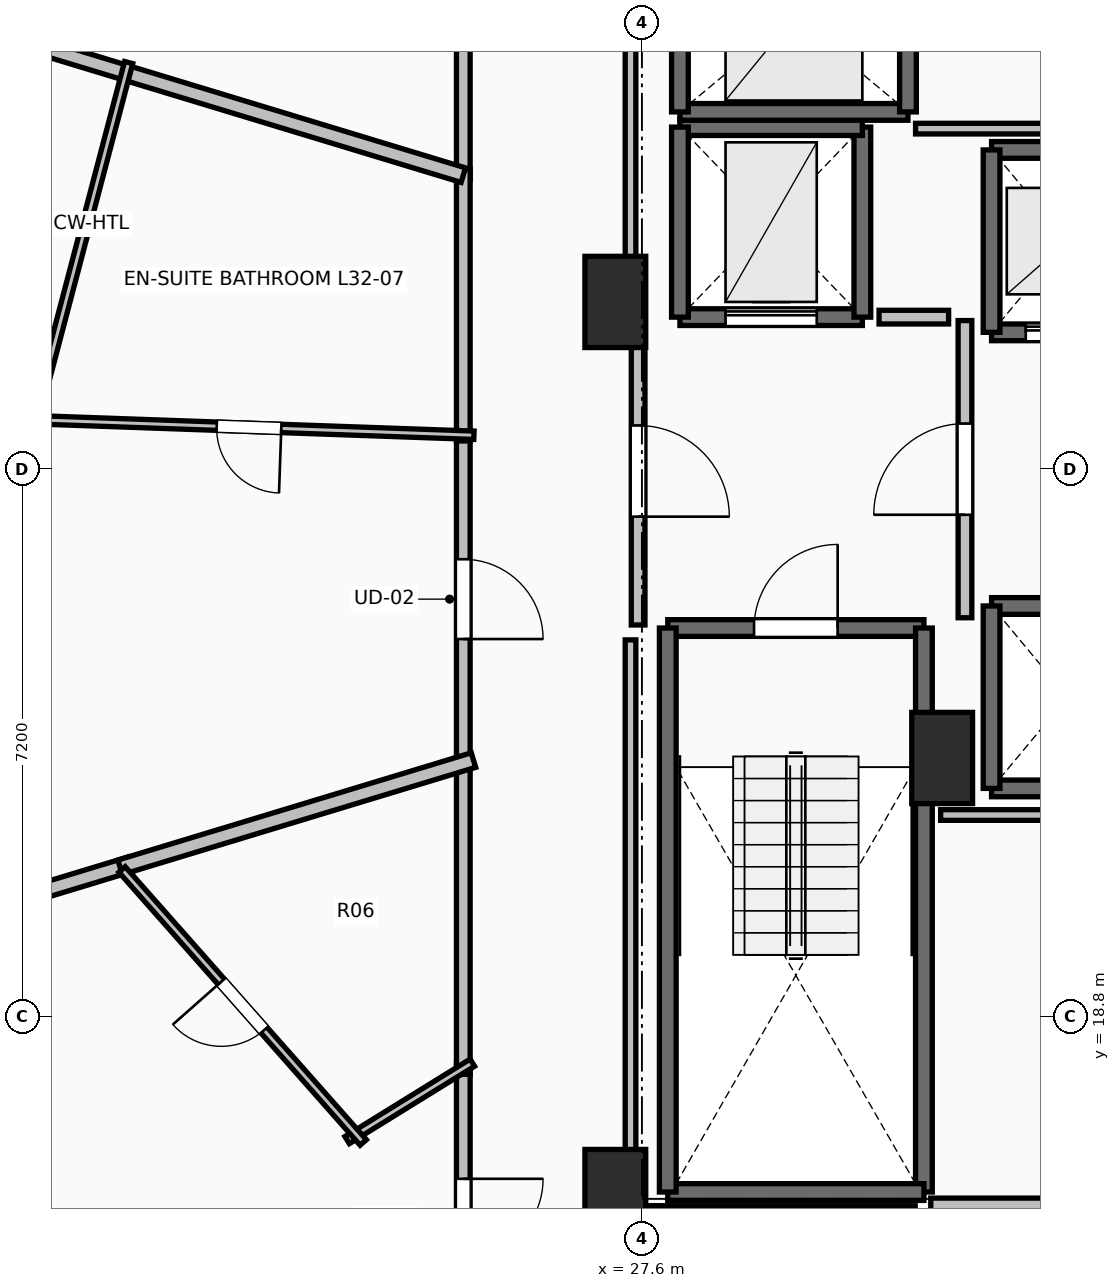
"""IFC4 building model, lengths in metres.
Left out: names, types, materials, properties, quantities, classifications, styles, units other than length and angle.
Written with IfcOpenShell. Run it as: python <this file> out.ifc"""

import sys

from ifc_helpers import new_model, si_unit, direction, frame, frame_2d, origin, origin_2d, place, context, subcontext, project, spatial, rectangle, extrude, element, fill, save


model = new_model("IFC4")
c1 = context("Model", 3, precision=1e-05, world=origin(), true_north=direction((0.0, 1.0)))
c2 = subcontext(c1, "Body", "Model", "MODEL_VIEW")
j1 = project(units=[si_unit("LENGTHUNIT", "METRE"), si_unit("PLANEANGLEUNIT", "RADIAN")], contexts=[c1])
p1 = place(None, origin())
s1 = spatial("IfcSite", under=j1, at=p1, CompositionType="ELEMENT")
p2 = place(p1, origin())
s2 = spatial("IfcBuilding", under=s1, at=p2, CompositionType="ELEMENT")
p3 = place(p2, frame((0.0, 0.0, 120.8)))
s3 = spatial("IfcBuildingStorey", under=s2, at=p3, CompositionType="ELEMENT", Elevation=120.8)
for number, where, z_axis, x_axis in (
    (1, (27.25, 16.45, 0.0), (0.0, 0.0, 1.0), (1.0, 0.0, 0.0)),
    (2, (27.25, 28.2, 0.0), (0.0, 0.0, 1.0), (1.0, 0.0, 0.0)),
    (3, (31.55, 22.2, 0.0), (0.0, 0.0, 1.0), (1.0, 0.0, 0.0)),
):
    element("IfcColumn", number, at=place(p3, frame(where, z_axis=z_axis, x_axis=x_axis)), inside=s3, PredefinedType="PILASTER", context=c2, shape_type="SweptSolid", body=[
        extrude(rectangle(XDim=0.8, YDim=1.2, at=origin_2d()), origin(), (0.0, 0.0, 1.0), 3.5),
    ])
p4 = place(p3, frame((27.94, 23.91, 0.0), z_axis=(0.0, 0.0, 1.0), x_axis=(1.0, 0.0, 0.0)))
e4 = element("IfcWall", 4, at=p4, inside=s3, PredefinedType="SOLIDWALL", context=c2, shape_type="SweptSolid", body=[
    extrude(rectangle(XDim=3.37, YDim=0.22, at=frame_2d((1.685, 0.0))), origin(), (0.0, 0.0, 1.0), 3.15),
])
p5 = place(p4, frame((1.135, 0.0, 0.0)))
e5 = element("IfcOpeningElement", 5, at=p5, cuts=e4, PredefinedType="OPENING", context=c2, shape_type="SweptSolid", body=[
    extrude(rectangle(XDim=1.1, YDim=2.15, at=frame_2d((0.55, 1.075))), frame((0.0, 0.125, 0.0), z_axis=(0.0, -1.0, 0.0), x_axis=(1.0, 0.0, 0.0)), (0.0, 0.0, 1.0), 0.25),
])
p6 = place(p3, frame((31.31, 23.91, 0.0), z_axis=(0.0, 0.0, 1.0), x_axis=(0.0, -1.0, 0.0)))
e6 = element("IfcWall", 6, at=p6, inside=s3, PredefinedType="SOLIDWALL", context=c2, shape_type="SweptSolid", body=[
    extrude(rectangle(XDim=7.42, YDim=0.22, at=frame_2d((3.71, 0.0))), origin(), (0.0, 0.0, 1.0), 3.15),
])
p7 = place(p3, frame((31.31, 16.49, 0.0), z_axis=(0.0, 0.0, 1.0), x_axis=(-1.0, 0.0, 0.0)))
e7 = element("IfcWall", 7, at=p7, inside=s3, PredefinedType="SOLIDWALL", context=c2, shape_type="SweptSolid", body=[
    extrude(rectangle(XDim=3.37, YDim=0.22, at=frame_2d((1.685, 0.0))), origin(), (0.0, 0.0, 1.0), 3.15),
])
p8 = place(p3, frame((27.94, 16.49, 0.0), z_axis=(0.0, 0.0, 1.0), x_axis=(0.0, 1.0, 0.0)))
e8 = element("IfcWall", 8, at=p8, inside=s3, PredefinedType="SOLIDWALL", context=c2, shape_type="SweptSolid", body=[
    extrude(rectangle(XDim=7.42, YDim=0.22, at=frame_2d((3.71, 0.0))), origin(), (0.0, 0.0, 1.0), 3.15),
])
p9 = place(p3, frame((32.2, 27.8, 0.0), z_axis=(0.0, 0.0, 1.0), x_axis=(1.0, 0.0, 0.0)))
e9 = element("IfcWall", 9, at=p9, inside=s3, PredefinedType="SOLIDWALL", context=c2, shape_type="SweptSolid", body=[
    extrude(rectangle(XDim=2.0, YDim=0.22, at=frame_2d((1.0, 0.0))), origin(), (0.0, 0.0, 1.0), 3.15),
])
p10 = place(p9, frame((0.45, 0.0, 0.0)))
e10 = element("IfcOpeningElement", 10, at=p10, cuts=e9, PredefinedType="OPENING", context=c2, shape_type="SweptSolid", body=[
    extrude(rectangle(XDim=1.1, YDim=2.2, at=frame_2d((0.55, 1.1))), frame((0.0, 0.125, 0.0), z_axis=(0.0, -1.0, 0.0), x_axis=(1.0, 0.0, 0.0)), (0.0, 0.0, 1.0), 0.25),
])
p11 = place(p3, frame((34.2, 30.2, 0.0), z_axis=(0.0, 0.0, 1.0), x_axis=(-1.0, 0.0, 0.0)))
e11 = element("IfcWall", 11, at=p11, inside=s3, PredefinedType="SOLIDWALL", context=c2, shape_type="SweptSolid", body=[
    extrude(rectangle(XDim=2.0, YDim=0.22, at=frame_2d((1.0, 0.0))), origin(), (0.0, 0.0, 1.0), 3.15),
])
p12 = place(p3, frame((32.2, 30.2, 0.0), z_axis=(0.0, 0.0, 1.0), x_axis=(0.0, -1.0, 0.0)))
e12 = element("IfcWall", 12, at=p12, inside=s3, PredefinedType="SOLIDWALL", context=c2, shape_type="SweptSolid", body=[
    extrude(rectangle(XDim=2.4, YDim=0.22, at=frame_2d((1.2, 0.0))), origin(), (0.0, 0.0, 1.0), 3.15),
])
for number, where, z_axis, x_axis in (
    (13, (32.2, 21.8, 0.0), (0.0, 0.0, 1.0), (1.0, 0.0, 0.0)),
    (14, (34.2, 24.2, 0.0), (0.0, 0.0, 1.0), (-1.0, 0.0, 0.0)),
):
    element("IfcWall", number, at=place(p3, frame(where, z_axis=z_axis, x_axis=x_axis)), inside=s3, PredefinedType="SOLIDWALL", context=c2, shape_type="SweptSolid", body=[
        extrude(rectangle(XDim=2.0, YDim=0.22, at=frame_2d((1.0, 0.0))), origin(), (0.0, 0.0, 1.0), 3.15),
    ])
p13 = place(p3, frame((32.2, 24.2, 0.0), z_axis=(0.0, 0.0, 1.0), x_axis=(0.0, -1.0, 0.0)))
e15 = element("IfcWall", 15, at=p13, inside=s3, PredefinedType="SOLIDWALL", context=c2, shape_type="SweptSolid", body=[
    extrude(rectangle(XDim=2.4, YDim=0.22, at=frame_2d((1.2, 0.0))), origin(), (0.0, 0.0, 1.0), 3.15),
])
p14 = place(p3, frame((28.1, 28.0, 0.0), z_axis=(0.0, 0.0, 1.0), x_axis=(1.0, 0.0, 0.0)))
e16 = element("IfcWall", 16, at=p14, inside=s3, PredefinedType="SHEAR", context=c2, shape_type="SweptSolid", body=[
    extrude(rectangle(XDim=2.4, YDim=0.22, at=frame_2d((1.2, 0.0))), origin(), (0.0, 0.0, 1.0), 3.15),
])
p15 = place(p14, frame((0.6, 0.0, 0.0)))
e17 = element("IfcOpeningElement", 17, at=p15, cuts=e16, PredefinedType="OPENING", context=c2, shape_type="SweptSolid", body=[
    extrude(rectangle(XDim=1.2, YDim=2.2, at=frame_2d((0.6, 1.1))), frame((0.0, 0.125, 0.0), z_axis=(0.0, -1.0, 0.0), x_axis=(1.0, 0.0, 0.0)), (0.0, 0.0, 1.0), 0.25),
])
p16 = place(p3, frame((30.5, 28.0, 0.0), z_axis=(0.0, 0.0, 1.0), x_axis=(0.0, 1.0, 0.0)))
e18 = element("IfcWall", 18, at=p16, inside=s3, PredefinedType="SHEAR", context=c2, shape_type="SweptSolid", body=[
    extrude(rectangle(XDim=2.5, YDim=0.22, at=frame_2d((1.25, 0.0))), origin(), (0.0, 0.0, 1.0), 3.15),
])
p17 = place(p3, frame((30.5, 30.5, 0.0), z_axis=(0.0, 0.0, 1.0), x_axis=(-1.0, 0.0, 0.0)))
e19 = element("IfcWall", 19, at=p17, inside=s3, PredefinedType="SHEAR", context=c2, shape_type="SweptSolid", body=[
    extrude(rectangle(XDim=2.4, YDim=0.22, at=frame_2d((1.2, 0.0))), origin(), (0.0, 0.0, 1.0), 3.15),
])
p18 = place(p3, frame((28.1, 30.5, 0.0), z_axis=(0.0, 0.0, 1.0), x_axis=(0.0, -1.0, 0.0)))
e20 = element("IfcWall", 20, at=p18, inside=s3, PredefinedType="SHEAR", context=c2, shape_type="SweptSolid", body=[
    extrude(rectangle(XDim=2.5, YDim=0.22, at=frame_2d((1.25, 0.0))), origin(), (0.0, 0.0, 1.0), 3.15),
])
p19 = place(p3, frame((28.1, 30.7, 0.0), z_axis=(0.0, 0.0, 1.0), x_axis=(1.0, 0.0, 0.0)))
e21 = element("IfcWall", 21, at=p19, inside=s3, PredefinedType="SOLIDWALL", context=c2, shape_type="SweptSolid", body=[
    extrude(rectangle(XDim=3.0, YDim=0.22, at=frame_2d((1.5, 0.0))), origin(), (0.0, 0.0, 1.0), 3.15),
])
for number, where, z_axis, x_axis in (
    (22, (31.1, 30.7, 0.0), (0.0, 0.0, 1.0), (0.0, 1.0, 0.0)),
    (23, (28.1, 33.2, 0.0), (0.0, 0.0, 1.0), (0.0, -1.0, 0.0)),
):
    element("IfcWall", number, at=place(p3, frame(where, z_axis=z_axis, x_axis=x_axis)), inside=s3, PredefinedType="SOLIDWALL", context=c2, shape_type="SweptSolid", body=[
        extrude(rectangle(XDim=2.5, YDim=0.22, at=frame_2d((1.25, 0.0))), origin(), (0.0, 0.0, 1.0), 3.15),
    ])
p20 = place(p3, frame((31.85, 24.045, 0.0), z_axis=(0.0, 0.0, 1.0), x_axis=(0.0, 1.0, 0.0)))
e24 = element("IfcWall", 24, at=p20, inside=s3, PredefinedType="PARTITIONING", context=c2, shape_type="SweptSolid", body=[
    extrude(rectangle(XDim=3.91, YDim=0.18, at=frame_2d((1.955, 0.0))), origin(), (0.0, 0.0, 1.0), 3.15),
])
p21 = place(p20, frame((1.355, 0.0, 0.0)))
e25 = element("IfcOpeningElement", 25, at=p21, cuts=e24, PredefinedType="OPENING", context=c2, shape_type="SweptSolid", body=[
    extrude(rectangle(XDim=1.2, YDim=2.15, at=frame_2d((0.6, 1.075))), frame((0.0, 0.105, 0.0), z_axis=(0.0, -1.0, 0.0), x_axis=(1.0, 0.0, 0.0)), (0.0, 0.0, 1.0), 0.21),
])
p22 = place(p3, frame((27.55, 28.0, 0.0), z_axis=(0.0, 0.0, 1.0), x_axis=(0.0, -1.0, 0.0)))
e26 = element("IfcWall", 26, at=p22, inside=s3, PredefinedType="PARTITIONING", context=c2, shape_type="SweptSolid", body=[
    extrude(rectangle(XDim=4.05, YDim=0.18, at=frame_2d((2.025, 0.0))), origin(), (0.0, 0.0, 1.0), 3.15),
])
p23 = place(p22, frame((1.425, 0.0, 0.0)))
e27 = element("IfcOpeningElement", 27, at=p23, cuts=e26, PredefinedType="OPENING", context=c2, shape_type="SweptSolid", body=[
    extrude(rectangle(XDim=1.2, YDim=2.15, at=frame_2d((0.6, 1.075))), frame((0.0, 0.105, 0.0), z_axis=(0.0, -1.0, 0.0), x_axis=(1.0, 0.0, 0.0)), (0.0, 0.0, 1.0), 0.21),
])
p24 = place(p3, frame((31.4, 16.32, 0.0), z_axis=(0.0, 0.0, 1.0), x_axis=(1.0, 0.0, 0.0)))
e28 = element("IfcWall", 28, at=p24, inside=s3, PredefinedType="PARTITIONING", context=c2, shape_type="SweptSolid", body=[
    extrude(rectangle(XDim=7.4, YDim=0.18, at=frame_2d((3.7, 0.0))), origin(), (0.0, 0.0, 1.0), 3.15),
])
p25 = place(p24, frame((3.275, 0.0, 0.0)))
e29 = element("IfcOpeningElement", 29, at=p25, cuts=e28, PredefinedType="OPENING", context=c2, shape_type="SweptSolid", body=[
    extrude(rectangle(XDim=0.85, YDim=2.1, at=frame_2d((0.425, 1.05))), frame((0.0, 0.105, 0.0), z_axis=(0.0, -1.0, 0.0), x_axis=(1.0, 0.0, 0.0)), (0.0, 0.0, 1.0), 0.21),
])
p26 = place(p3, frame((25.25, 35.261, 0.0), z_axis=(0.0, 0.0, 1.0), x_axis=(0.0, -1.0, 0.0)))
e30 = element("IfcWall", 30, at=p26, inside=s3, PredefinedType="PARTITIONING", context=c2, shape_type="SweptSolid", body=[
    extrude(rectangle(XDim=5.453, YDim=0.18, at=frame_2d((2.727, 0.0))), origin(), (0.0, 0.0, 1.0), 2.342),
])
p27 = place(p26, frame((2.201, 0.0, 0.0)))
e31 = element("IfcOpeningElement", 31, at=p27, cuts=e30, PredefinedType="OPENING", context=c2, shape_type="SweptSolid", body=[
    extrude(rectangle(XDim=1.05, YDim=2.2, at=frame_2d((0.525, 1.1))), frame((0.0, 0.105, 0.0), z_axis=(0.0, -1.0, 0.0), x_axis=(1.0, 0.0, 0.0)), (0.0, 0.0, 1.0), 0.21),
])
p28 = place(p3, frame((25.25, 26.511, 0.0), z_axis=(0.0, 0.0, 1.0), x_axis=(0.0, -1.0, 0.0)))
e32 = element("IfcWall", 32, at=p28, inside=s3, PredefinedType="PARTITIONING", context=c2, shape_type="SweptSolid", body=[
    extrude(rectangle(XDim=4.442, YDim=0.18, at=frame_2d((2.221, 0.0))), origin(), (0.0, 0.0, 1.0), 3.15),
])
p29 = place(p28, frame((1.696, 0.0, 0.0)))
e33 = element("IfcOpeningElement", 33, at=p29, cuts=e32, PredefinedType="OPENING", context=c2, shape_type="SweptSolid", body=[
    extrude(rectangle(XDim=1.05, YDim=2.2, at=frame_2d((0.525, 1.1))), frame((0.0, 0.105, 0.0), z_axis=(0.0, -1.0, 0.0), x_axis=(1.0, 0.0, 0.0)), (0.0, 0.0, 1.0), 0.21),
])
p30 = place(p3, frame((25.25, 29.948, 0.0), z_axis=(0.0, 0.0, 1.0), x_axis=(0.0, -1.0, 0.0)))
e34 = element("IfcWall", 34, at=p30, inside=s3, PredefinedType="PARTITIONING", context=c2, shape_type="SweptSolid", body=[
    extrude(rectangle(XDim=3.577, YDim=0.18, at=frame_2d((1.789, 0.0))), origin(), (0.0, 0.0, 1.0), 2.342),
])
p31 = place(p3, frame((25.25, 18.178, 0.0), z_axis=(0.0, 0.0, 1.0), x_axis=(0.0, -1.0, 0.0)))
e35 = element("IfcWall", 35, at=p31, inside=s3, PredefinedType="PARTITIONING", context=c2, shape_type="SweptSolid", body=[
    extrude(rectangle(XDim=4.078, YDim=0.18, at=frame_2d((2.039, 0.0))), origin(), (0.0, 0.0, 1.0), 2.342),
])
p32 = place(p31, frame((1.514, 0.0, 0.0)))
e36 = element("IfcOpeningElement", 36, at=p32, cuts=e35, PredefinedType="OPENING", context=c2, shape_type="SweptSolid", body=[
    extrude(rectangle(XDim=1.05, YDim=2.2, at=frame_2d((0.525, 1.1))), frame((0.0, 0.105, 0.0), z_axis=(0.0, -1.0, 0.0), x_axis=(1.0, 0.0, 0.0)), (0.0, 0.0, 1.0), 0.21),
])
p33 = place(p3, frame((25.25, 22.209, 0.0), z_axis=(0.0, 0.0, 1.0), x_axis=(0.0, -1.0, 0.0)))
e37 = element("IfcWall", 37, at=p33, inside=s3, PredefinedType="PARTITIONING", context=c2, shape_type="SweptSolid", body=[
    extrude(rectangle(XDim=4.171, YDim=0.18, at=frame_2d((2.085, 0.0))), origin(), (0.0, 0.0, 1.0), 3.15),
])
p34 = place(p3, frame((13.663, 33.383, 0.0), z_axis=(0.0, 0.0, 1.0), x_axis=(0.956933802543, -0.290306213422, 0.0)))
e38 = element("IfcWall", 38, at=p34, inside=s3, PredefinedType="PARTITIONING", context=c2, shape_type="SweptSolid", body=[
    extrude(rectangle(XDim=12.108, YDim=0.2, at=frame_2d((6.054, 0.0))), origin(), (0.0, 0.0, 1.0), 2.342),
])
p35 = place(p3, frame((19.575, 26.515, 0.0), z_axis=(0.0, 0.0, 1.0), x_axis=(0.254478876497, 0.967078332617, 0.0)))
e39 = element("IfcWall", 39, at=p35, inside=s3, PredefinedType="PARTITIONING", context=c2, shape_type="SweptSolid", body=[
    extrude(rectangle(XDim=4.999, YDim=0.11, at=frame_2d((2.5, 0.0))), origin(), (0.0, 0.0, 1.0), 2.342),
])
p36 = place(p3, frame((25.39, 26.446, 0.0), z_axis=(0.0, 0.0, 1.0), x_axis=(-0.999378666741, 0.03524599926, 0.0)))
e40 = element("IfcWall", 40, at=p36, inside=s3, PredefinedType="PARTITIONING", context=c2, shape_type="SweptSolid", body=[
    extrude(rectangle(XDim=5.922, YDim=0.11, at=frame_2d((2.961, 0.0))), origin(), (0.0, 0.0, 1.0), 2.342),
])
p37 = place(p36, frame((2.536, 0.0, 0.0)))
e41 = element("IfcOpeningElement", 41, at=p37, cuts=e40, PredefinedType="OPENING", context=c2, shape_type="SweptSolid", body=[
    extrude(rectangle(XDim=0.85, YDim=2.1, at=frame_2d((0.425, 1.05))), frame((0.0, 0.07, 0.0), z_axis=(0.0, -1.0, 0.0), x_axis=(1.0, 0.0, 0.0)), (0.0, 0.0, 1.0), 0.14),
])
p38 = place(p3, frame((13.663, 18.617, 0.0), z_axis=(0.0, 0.0, 1.0), x_axis=(0.956933827214, 0.290306132098, 0.0)))
e42 = element("IfcWall", 42, at=p38, inside=s3, PredefinedType="PARTITIONING", context=c2, shape_type="SweptSolid", body=[
    extrude(rectangle(XDim=7.53, YDim=0.2, at=frame_2d((3.765, 0.0))), origin(), (0.0, 0.0, 1.0), 2.839),
])
p39 = place(p3, frame((20.735, 20.762, 0.0), z_axis=(0.0, 0.0, 1.0), x_axis=(0.956916986017, 0.290361639807, 0.0)))
e43 = element("IfcWall", 43, at=p39, inside=s3, PredefinedType="PARTITIONING", context=c2, shape_type="SweptSolid", body=[
    extrude(rectangle(XDim=4.858, YDim=0.2, at=frame_2d((2.429, 0.0))), origin(), (0.0, 0.0, 1.0), 2.784),
])
p40 = place(p3, frame((25.369, 18.192, 0.0), z_axis=(0.0, 0.0, 1.0), x_axis=(-0.850587393094, -0.525833706328, 0.0)))
e44 = element("IfcWall", 44, at=p40, inside=s3, PredefinedType="PARTITIONING", context=c2, shape_type="SweptSolid", body=[
    extrude(rectangle(XDim=1.937, YDim=0.11, at=frame_2d((0.968, 0.0))), origin(), (0.0, 0.0, 1.0), 2.342),
])
p41 = place(p3, frame((23.934, 17.142, 0.0), z_axis=(0.0, 0.0, 1.0), x_axis=(-0.662103338525, 0.749412549344, 0.0)))
e45 = element("IfcWall", 45, at=p41, inside=s3, PredefinedType="PARTITIONING", context=c2, shape_type="SweptSolid", body=[
    extrude(rectangle(XDim=4.793, YDim=0.11, at=frame_2d((2.396, 0.0))), origin(), (0.0, 0.0, 1.0), 2.342),
])
p42 = place(p41, frame((1.971, 0.0, 0.0)))
e46 = element("IfcOpeningElement", 46, at=p42, cuts=e45, PredefinedType="OPENING", context=c2, shape_type="SweptSolid", body=[
    extrude(rectangle(XDim=0.85, YDim=2.1, at=frame_2d((0.425, 1.05))), frame((0.0, 0.07, 0.0), z_axis=(0.0, -1.0, 0.0), x_axis=(1.0, 0.0, 0.0)), (0.0, 0.0, 1.0), 0.14),
])
p43 = place(p3, frame((31.635, 28.0, 0.0), z_axis=(0.0, 0.0, 1.0), x_axis=(-1.0, 0.0, 0.0)))
e47 = element("IfcWall", 47, at=p43, inside=s3, PredefinedType="PARTITIONING", context=c2, shape_type="SweptSolid", body=[
    extrude(rectangle(XDim=0.915, YDim=0.18, at=frame_2d((0.458, 0.0))), origin(), (0.0, 0.0, 1.0), 3.15),
])
p44 = place(p3, frame((31.2, 30.48, 0.0), z_axis=(0.0, 0.0, 1.0), x_axis=(1.0, 0.0, 0.0)))
e48 = element("IfcWall", 48, at=p44, inside=s3, PredefinedType="PARTITIONING", context=c2, shape_type="SweptSolid", body=[
    extrude(rectangle(XDim=2.05, YDim=0.14, at=frame_2d((1.025, 0.0))), origin(), (0.0, 0.0, 1.0), 3.15),
])
p45 = place(p3, frame((36.439, 21.45, 0.0), z_axis=(0.0, 0.0, 1.0), x_axis=(-1.0, 0.0, 0.0)))
e49 = element("IfcWall", 49, at=p45, inside=s3, PredefinedType="PARTITIONING", context=c2, shape_type="SweptSolid", body=[
    extrude(rectangle(XDim=4.909, YDim=0.14, at=frame_2d((2.455, 0.0))), origin(), (0.0, 0.0, 1.0), 3.15),
])
p46 = place(p3, frame((31.195, 16.24, 0.0), z_axis=(0.0, 0.0, 1.0), x_axis=(-1.0, 0.0, 0.0)))
e50 = element("IfcWall", 50, at=p46, inside=s3, PredefinedType="PARTITIONING", context=c2, shape_type="SweptSolid", body=[
    extrude(rectangle(XDim=3.745, YDim=0.14, at=frame_2d((1.873, 0.0))), origin(), (0.0, 0.0, 1.0), 2.342),
])
p47 = place(p3, frame((27.45, 16.24, 0.0), z_axis=(0.0, 0.0, 1.0), x_axis=(0.0, 1.0, 0.0)))
e51 = element("IfcWall", 51, at=p47, inside=s3, PredefinedType="PARTITIONING", context=c2, shape_type="SweptSolid", body=[
    extrude(rectangle(XDim=7.514, YDim=0.14, at=frame_2d((3.757, 0.0))), origin(), (0.0, 0.0, 1.0), 2.342),
])
p48 = place(p3, frame((27.45, 28.196, 0.0), z_axis=(0.0, 0.0, 1.0), x_axis=(0.0, 1.0, 0.0)))
e52 = element("IfcWall", 52, at=p48, inside=s3, PredefinedType="PARTITIONING", context=c2, shape_type="SweptSolid", body=[
    extrude(rectangle(XDim=5.254, YDim=0.14, at=frame_2d((2.627, 0.0))), origin(), (0.0, 0.0, 1.0), 2.342),
])
p49 = place(p5, origin())
e53 = element("IfcDoor", 53, at=p49, inside=s3, OperationType="SINGLE_SWING_RIGHT", PredefinedType="DOOR", context=c2, shape_type="SweptSolid", body=[
    extrude(rectangle(XDim=1.1, YDim=2.15, at=frame_2d((0.55, 1.075))), frame((0.0, 0.025, 0.0), z_axis=(0.0, -1.0, 0.0), x_axis=(1.0, 0.0, 0.0)), (0.0, 0.0, 1.0), 0.05),
])
fill(e5, e53)
p50 = place(p10, origin())
e54 = element("IfcDoor", 54, at=p50, inside=s3, OperationType="SLIDING_TO_LEFT", PredefinedType="DOOR", context=c2, shape_type="SweptSolid", body=[
    extrude(rectangle(XDim=1.1, YDim=2.2, at=frame_2d((0.55, 1.1))), frame((0.0, 0.025, 0.0), z_axis=(0.0, -1.0, 0.0), x_axis=(1.0, 0.0, 0.0)), (0.0, 0.0, 1.0), 0.05),
])
fill(e10, e54)
p51 = place(p15, origin())
e55 = element("IfcDoor", 55, at=p51, inside=s3, OperationType="SLIDING_TO_LEFT", PredefinedType="DOOR", context=c2, shape_type="SweptSolid", body=[
    extrude(rectangle(XDim=1.2, YDim=2.2, at=frame_2d((0.6, 1.1))), frame((0.0, 0.025, 0.0), z_axis=(0.0, -1.0, 0.0), x_axis=(1.0, 0.0, 0.0)), (0.0, 0.0, 1.0), 0.05),
])
fill(e17, e55)
p52 = place(p21, origin())
e56 = element("IfcDoor", 56, at=p52, inside=s3, OperationType="SINGLE_SWING_LEFT", PredefinedType="DOOR", context=c2, shape_type="SweptSolid", body=[
    extrude(rectangle(XDim=1.2, YDim=2.15, at=frame_2d((0.6, 1.075))), frame((0.0, 0.025, 0.0), z_axis=(0.0, -1.0, 0.0), x_axis=(1.0, 0.0, 0.0)), (0.0, 0.0, 1.0), 0.05),
])
fill(e25, e56)
p53 = place(p23, origin())
e57 = element("IfcDoor", 57, at=p53, inside=s3, OperationType="SINGLE_SWING_RIGHT", PredefinedType="DOOR", context=c2, shape_type="SweptSolid", body=[
    extrude(rectangle(XDim=1.2, YDim=2.15, at=frame_2d((0.6, 1.075))), frame((0.0, 0.025, 0.0), z_axis=(0.0, -1.0, 0.0), x_axis=(1.0, 0.0, 0.0)), (0.0, 0.0, 1.0), 0.05),
])
fill(e27, e57)
p54 = place(p29, origin())
e58 = element("IfcDoor", 58, at=p54, inside=s3, OperationType="SINGLE_SWING_RIGHT", PredefinedType="DOOR", context=c2, shape_type="SweptSolid", body=[
    extrude(rectangle(XDim=1.05, YDim=2.2, at=frame_2d((0.525, 1.1))), frame((0.0, 0.025, 0.0), z_axis=(0.0, -1.0, 0.0), x_axis=(1.0, 0.0, 0.0)), (0.0, 0.0, 1.0), 0.05),
])
fill(e33, e58)
p55 = place(p32, origin())
e59 = element("IfcDoor", 59, at=p55, inside=s3, OperationType="SINGLE_SWING_LEFT", PredefinedType="DOOR", context=c2, shape_type="SweptSolid", body=[
    extrude(rectangle(XDim=1.05, YDim=2.2, at=frame_2d((0.525, 1.1))), frame((0.0, 0.025, 0.0), z_axis=(0.0, -1.0, 0.0), x_axis=(1.0, 0.0, 0.0)), (0.0, 0.0, 1.0), 0.05),
])
fill(e36, e59)
p56 = place(p37, origin())
e60 = element("IfcDoor", 60, at=p56, inside=s3, OperationType="SINGLE_SWING_LEFT", PredefinedType="DOOR", context=c2, shape_type="SweptSolid", body=[
    extrude(rectangle(XDim=0.85, YDim=2.1, at=frame_2d((0.425, 1.05))), frame((0.0, 0.025, 0.0), z_axis=(0.0, -1.0, 0.0), x_axis=(1.0, 0.0, 0.0)), (0.0, 0.0, 1.0), 0.05),
])
fill(e41, e60)
p57 = place(p42, origin())
e61 = element("IfcDoor", 61, at=p57, inside=s3, OperationType="SINGLE_SWING_RIGHT", PredefinedType="DOOR", context=c2, shape_type="SweptSolid", body=[
    extrude(rectangle(XDim=0.85, YDim=2.1, at=frame_2d((0.425, 1.05))), frame((0.0, 0.025, 0.0), z_axis=(0.0, -1.0, 0.0), x_axis=(1.0, 0.0, 0.0)), (0.0, 0.0, 1.0), 0.05),
])
fill(e46, e61)
save(model, sys.argv[1])
